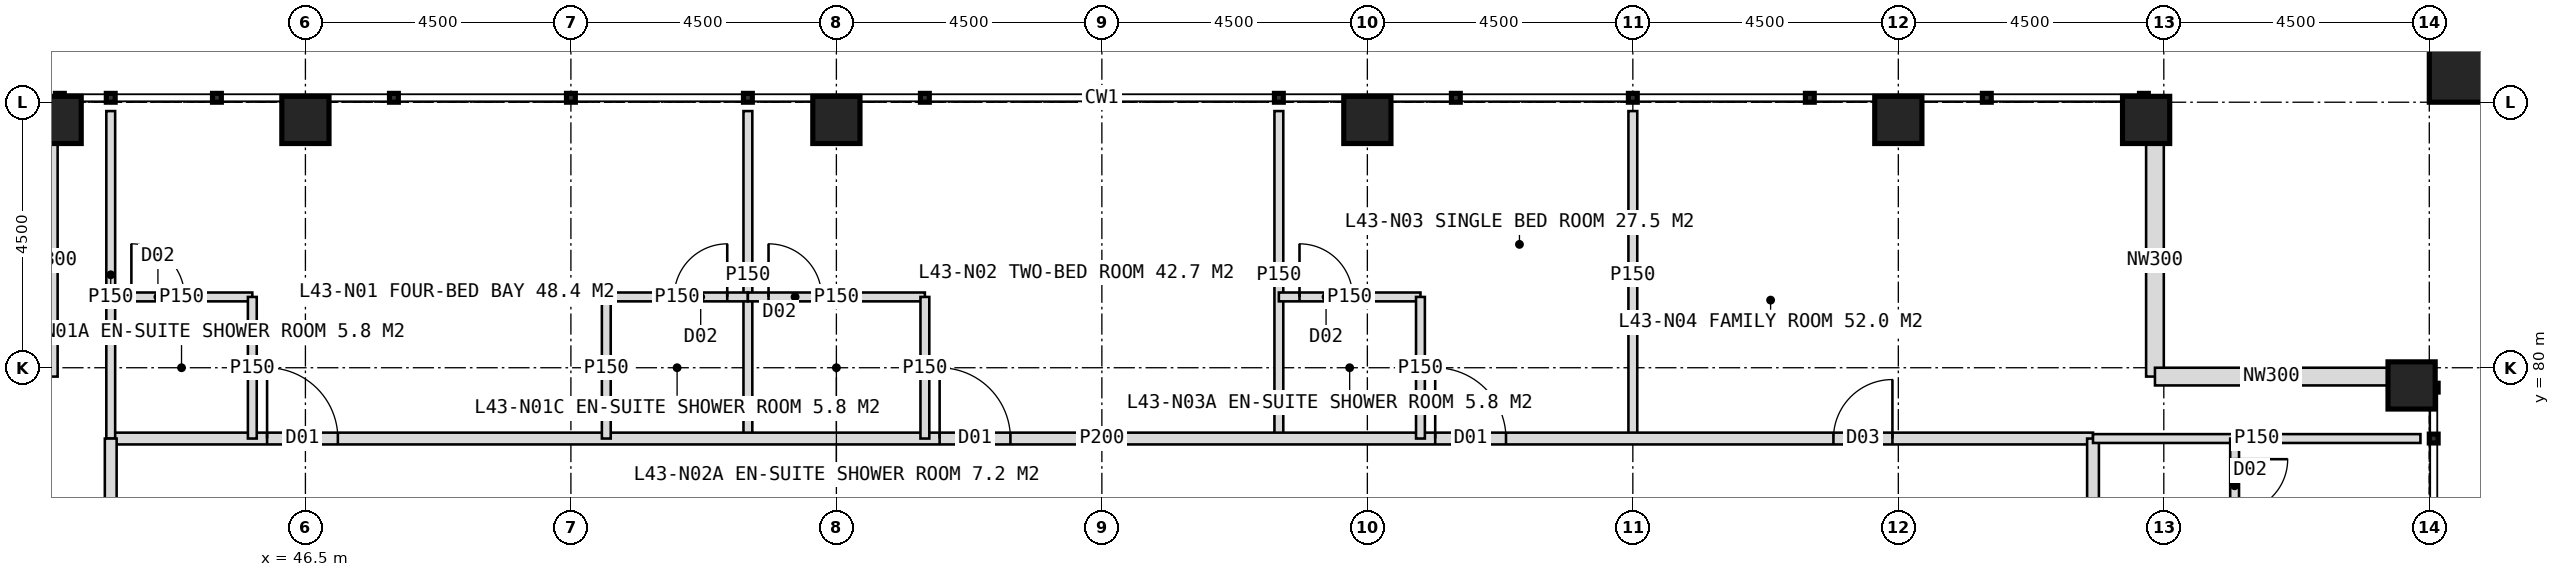
"""IFC4 building model, lengths in metres.
Left out: names, types, materials, properties, quantities, classifications, styles, units other than length and angle.
Written with IfcOpenShell. Run it as: python <this file> out.ifc"""

import sys

from ifc_helpers import new_model, si_unit, direction, frame, frame_2d, origin, origin_2d, place, context, subcontext, project, spatial, rectangle, hollow_rectangle, extrude, element, fill, save


model = new_model("IFC4")
c1 = context("Model", 3, precision=1e-05, world=origin(), true_north=direction((0.0, 1.0)))
c2 = subcontext(c1, "Body", "Model", "MODEL_VIEW")
j1 = project(units=[si_unit("LENGTHUNIT", "METRE"), si_unit("PLANEANGLEUNIT", "RADIAN")], contexts=[c1])
p1 = place(None, origin())
s1 = spatial("IfcSite", under=j1, at=p1, CompositionType="ELEMENT")
p2 = place(p1, origin())
s2 = spatial("IfcBuilding", under=s1, at=p2, CompositionType="ELEMENT")
p3 = place(p2, frame((0.0, 0.0, 181.0)))
s3 = spatial("IfcBuildingStorey", under=s2, at=p3, CompositionType="ELEMENT", Elevation=181.0)
for number, where, z_axis, x_axis in (
    (1, (42.3, 84.2, 0.0), (0.0, 0.0, 1.0), (1.0, 0.0, 0.0)),
    (2, (46.5, 84.2, 0.0), (0.0, 0.0, 1.0), (1.0, 0.0, 0.0)),
    (3, (55.5, 84.2, 0.0), (0.0, 0.0, 1.0), (1.0, 0.0, 0.0)),
    (4, (64.5, 84.2, 0.0), (0.0, 0.0, 1.0), (1.0, 0.0, 0.0)),
    (5, (73.5, 84.2, 0.0), (0.0, 0.0, 1.0), (1.0, 0.0, 0.0)),
    (6, (77.7, 84.2, 0.0), (0.0, 0.0, 1.0), (1.0, 0.0, 0.0)),
    (7, (82.2, 79.7, 0.0), (0.0, 0.0, 1.0), (1.0, 0.0, 0.0)),
):
    element("IfcColumn", number, at=place(p3, frame(where, z_axis=z_axis, x_axis=x_axis)), inside=s3, PredefinedType="COLUMN", context=c2, shape_type="SweptSolid", body=[
        extrude(hollow_rectangle(XDim=0.8, YDim=0.8, WallThickness=0.08, at=origin_2d()), origin(), (0.0, 0.0, 1.0), 4.0),
    ])
p4 = place(p3, frame((83.1, 85.1, 0.0), z_axis=(0.0, 0.0, 1.0), x_axis=(1.0, 0.0, 0.0)))
e8 = element("IfcColumn", 8, at=p4, inside=s3, PredefinedType="COLUMN", context=c2, shape_type="SweptSolid", body=[
    extrude(hollow_rectangle(XDim=1.2, YDim=1.2, WallThickness=0.07, at=origin_2d()), origin(), (0.0, 0.0, 1.0), 4.0),
])
for number, where, z_axis, x_axis in (
    (9, (77.85, 83.8, 0.0), (0.0, 0.0, 1.0), (0.0, -1.0, 0.0)),
    (10, (77.85, 79.85, 0.0), (0.0, 0.0, 1.0), (1.0, 0.0, 0.0)),
    (11, (42.15, 79.85, 0.0), (0.0, 0.0, 1.0), (0.0, 1.0, 0.0)),
):
    element("IfcWall", number, at=place(p3, frame(where, z_axis=z_axis, x_axis=x_axis)), inside=s3, PredefinedType="ELEMENTEDWALL", context=c2, shape_type="SweptSolid", body=[
        extrude(rectangle(XDim=3.95, YDim=0.3, at=frame_2d((1.975, 0.0))), origin(), (0.0, 0.0, 1.0), 2.85),
    ])
for number, where, z_axis, x_axis in (
    (12, (54.0, 78.8, 0.0), (0.0, 0.0, 1.0), (0.0, 1.0, 0.0)),
    (13, (63.0, 78.8, 0.0), (0.0, 0.0, 1.0), (0.0, 1.0, 0.0)),
    (14, (69.0, 78.8, 0.0), (0.0, 0.0, 1.0), (0.0, 1.0, 0.0)),
):
    element("IfcWall", number, at=place(p3, frame(where, z_axis=z_axis, x_axis=x_axis)), inside=s3, PredefinedType="PARTITIONING", context=c2, shape_type="SweptSolid", body=[
        extrude(rectangle(XDim=5.55, YDim=0.15, at=frame_2d((2.775, 0.0))), origin(), (0.0, 0.0, 1.0), 3.75),
    ])
p5 = place(p3, frame((43.2, 78.8, 0.0), z_axis=(0.0, 0.0, 1.0), x_axis=(1.0, 0.0, 0.0)))
e15 = element("IfcWall", 15, at=p5, inside=s3, PredefinedType="PARTITIONING", context=c2, shape_type="SweptSolid", body=[
    extrude(rectangle(XDim=33.6, YDim=0.2, at=frame_2d((16.8, 0.0))), origin(), (0.0, 0.0, 1.0), 3.75),
])
p6 = place(p5, frame((2.65, 0.0, 0.0)))
e16 = element("IfcOpeningElement", 16, at=p6, cuts=e15, PredefinedType="OPENING", context=c2, shape_type="SweptSolid", body=[
    extrude(rectangle(XDim=1.2, YDim=2.2, at=frame_2d((0.6, 1.1))), frame((0.0, 0.11, 0.0), z_axis=(0.0, -1.0, 0.0), x_axis=(1.0, 0.0, 0.0)), (0.0, 0.0, 1.0), 0.22),
])
p7 = place(p5, frame((14.05, 0.0, 0.0)))
e17 = element("IfcOpeningElement", 17, at=p7, cuts=e15, PredefinedType="OPENING", context=c2, shape_type="SweptSolid", body=[
    extrude(rectangle(XDim=1.2, YDim=2.2, at=frame_2d((0.6, 1.1))), frame((0.0, 0.11, 0.0), z_axis=(0.0, -1.0, 0.0), x_axis=(1.0, 0.0, 0.0)), (0.0, 0.0, 1.0), 0.22),
])
p8 = place(p5, frame((22.45, 0.0, 0.0)))
e18 = element("IfcOpeningElement", 18, at=p8, cuts=e15, PredefinedType="OPENING", context=c2, shape_type="SweptSolid", body=[
    extrude(rectangle(XDim=1.2, YDim=2.2, at=frame_2d((0.6, 1.1))), frame((0.0, 0.11, 0.0), z_axis=(0.0, -1.0, 0.0), x_axis=(1.0, 0.0, 0.0)), (0.0, 0.0, 1.0), 0.22),
])
p9 = place(p5, frame((29.2, 0.0, 0.0)))
e19 = element("IfcOpeningElement", 19, at=p9, cuts=e15, PredefinedType="OPENING", context=c2, shape_type="SweptSolid", body=[
    extrude(rectangle(XDim=1.0, YDim=2.1, at=frame_2d((0.5, 1.05))), frame((0.0, 0.11, 0.0), z_axis=(0.0, -1.0, 0.0), x_axis=(1.0, 0.0, 0.0)), (0.0, 0.0, 1.0), 0.22),
])
p10 = place(p3, frame((43.2, 78.8, 0.0), z_axis=(0.0, 0.0, 1.0), x_axis=(0.0, 1.0, 0.0)))
e20 = element("IfcWall", 20, at=p10, inside=s3, PredefinedType="PARTITIONING", context=c2, shape_type="SweptSolid", body=[
    extrude(rectangle(XDim=5.55, YDim=0.15, at=frame_2d((2.775, 0.0))), origin(), (0.0, 0.0, 1.0), 3.75),
])
p11 = place(p3, frame((43.2, 81.2, 0.0), z_axis=(0.0, 0.0, 1.0), x_axis=(1.0, 0.0, 0.0)))
e21 = element("IfcWall", 21, at=p11, inside=s3, PredefinedType="PARTITIONING", context=c2, shape_type="SweptSolid", body=[
    extrude(rectangle(XDim=2.4, YDim=0.15, at=frame_2d((1.2, 0.0))), origin(), (0.0, 0.0, 1.0), 3.75),
])
p12 = place(p11, frame((0.35, 0.0, 0.0)))
e22 = element("IfcOpeningElement", 22, at=p12, cuts=e21, PredefinedType="OPENING", context=c2, shape_type="SweptSolid", body=[
    extrude(rectangle(XDim=0.9, YDim=2.1, at=frame_2d((0.45, 1.05))), frame((0.0, 0.085, 0.0), z_axis=(0.0, -1.0, 0.0), x_axis=(1.0, 0.0, 0.0)), (0.0, 0.0, 1.0), 0.17),
])
p13 = place(p3, frame((45.6, 78.8, 0.0), z_axis=(0.0, 0.0, 1.0), x_axis=(0.0, 1.0, 0.0)))
e23 = element("IfcWall", 23, at=p13, inside=s3, PredefinedType="PARTITIONING", context=c2, shape_type="SweptSolid", body=[
    extrude(rectangle(XDim=2.4, YDim=0.15, at=frame_2d((1.2, 0.0))), origin(), (0.0, 0.0, 1.0), 3.75),
])
p14 = place(p3, frame((51.6, 81.2, 0.0), z_axis=(0.0, 0.0, 1.0), x_axis=(1.0, 0.0, 0.0)))
e24 = element("IfcWall", 24, at=p14, inside=s3, PredefinedType="PARTITIONING", context=c2, shape_type="SweptSolid", body=[
    extrude(rectangle(XDim=2.4, YDim=0.15, at=frame_2d((1.2, 0.0))), origin(), (0.0, 0.0, 1.0), 3.75),
])
p15 = place(p14, frame((1.15, 0.0, 0.0)))
e25 = element("IfcOpeningElement", 25, at=p15, cuts=e24, PredefinedType="OPENING", context=c2, shape_type="SweptSolid", body=[
    extrude(rectangle(XDim=0.9, YDim=2.1, at=frame_2d((0.45, 1.05))), frame((0.0, 0.085, 0.0), z_axis=(0.0, -1.0, 0.0), x_axis=(1.0, 0.0, 0.0)), (0.0, 0.0, 1.0), 0.17),
])
p16 = place(p3, frame((51.6, 78.8, 0.0), z_axis=(0.0, 0.0, 1.0), x_axis=(0.0, 1.0, 0.0)))
e26 = element("IfcWall", 26, at=p16, inside=s3, PredefinedType="PARTITIONING", context=c2, shape_type="SweptSolid", body=[
    extrude(rectangle(XDim=2.4, YDim=0.15, at=frame_2d((1.2, 0.0))), origin(), (0.0, 0.0, 1.0), 3.75),
])
p17 = place(p3, frame((54.0, 81.2, 0.0), z_axis=(0.0, 0.0, 1.0), x_axis=(1.0, 0.0, 0.0)))
e27 = element("IfcWall", 27, at=p17, inside=s3, PredefinedType="PARTITIONING", context=c2, shape_type="SweptSolid", body=[
    extrude(rectangle(XDim=3.0, YDim=0.15, at=frame_2d((1.5, 0.0))), origin(), (0.0, 0.0, 1.0), 3.75),
])
p18 = place(p17, frame((0.35, 0.0, 0.0)))
e28 = element("IfcOpeningElement", 28, at=p18, cuts=e27, PredefinedType="OPENING", context=c2, shape_type="SweptSolid", body=[
    extrude(rectangle(XDim=0.9, YDim=2.1, at=frame_2d((0.45, 1.05))), frame((0.0, 0.085, 0.0), z_axis=(0.0, -1.0, 0.0), x_axis=(1.0, 0.0, 0.0)), (0.0, 0.0, 1.0), 0.17),
])
p19 = place(p3, frame((57.0, 78.8, 0.0), z_axis=(0.0, 0.0, 1.0), x_axis=(0.0, 1.0, 0.0)))
e29 = element("IfcWall", 29, at=p19, inside=s3, PredefinedType="PARTITIONING", context=c2, shape_type="SweptSolid", body=[
    extrude(rectangle(XDim=2.4, YDim=0.15, at=frame_2d((1.2, 0.0))), origin(), (0.0, 0.0, 1.0), 3.75),
])
p20 = place(p3, frame((63.0, 81.2, 0.0), z_axis=(0.0, 0.0, 1.0), x_axis=(1.0, 0.0, 0.0)))
e30 = element("IfcWall", 30, at=p20, inside=s3, PredefinedType="PARTITIONING", context=c2, shape_type="SweptSolid", body=[
    extrude(rectangle(XDim=2.4, YDim=0.15, at=frame_2d((1.2, 0.0))), origin(), (0.0, 0.0, 1.0), 3.75),
])
p21 = place(p20, frame((0.35, 0.0, 0.0)))
e31 = element("IfcOpeningElement", 31, at=p21, cuts=e30, PredefinedType="OPENING", context=c2, shape_type="SweptSolid", body=[
    extrude(rectangle(XDim=0.9, YDim=2.1, at=frame_2d((0.45, 1.05))), frame((0.0, 0.085, 0.0), z_axis=(0.0, -1.0, 0.0), x_axis=(1.0, 0.0, 0.0)), (0.0, 0.0, 1.0), 0.17),
])
p22 = place(p3, frame((65.4, 78.8, 0.0), z_axis=(0.0, 0.0, 1.0), x_axis=(0.0, 1.0, 0.0)))
e32 = element("IfcWall", 32, at=p22, inside=s3, PredefinedType="PARTITIONING", context=c2, shape_type="SweptSolid", body=[
    extrude(rectangle(XDim=2.4, YDim=0.15, at=frame_2d((1.2, 0.0))), origin(), (0.0, 0.0, 1.0), 3.75),
])
p23 = place(p3, frame((43.2, 45.2, 0.0), z_axis=(0.0, 0.0, 1.0), x_axis=(0.0, 1.0, 0.0)))
e33 = element("IfcWall", 33, at=p23, inside=s3, PredefinedType="PARTITIONING", context=c2, shape_type="SweptSolid", body=[
    extrude(rectangle(XDim=33.6, YDim=0.2, at=frame_2d((16.8, 0.0))), origin(), (0.0, 0.0, 1.0), 3.75),
])
p24 = place(p23, frame((2.65, 0.0, 0.0)))
e34 = element("IfcOpeningElement", 34, at=p24, cuts=e33, PredefinedType="OPENING", context=c2, shape_type="SweptSolid", body=[
    extrude(rectangle(XDim=1.2, YDim=2.2, at=frame_2d((0.6, 1.1))), frame((0.0, 0.11, 0.0), z_axis=(0.0, -1.0, 0.0), x_axis=(1.0, 0.0, 0.0)), (0.0, 0.0, 1.0), 0.22),
])
p25 = place(p23, frame((13.45, 0.0, 0.0)))
e35 = element("IfcOpeningElement", 35, at=p25, cuts=e33, PredefinedType="OPENING", context=c2, shape_type="SweptSolid", body=[
    extrude(rectangle(XDim=1.2, YDim=2.2, at=frame_2d((0.6, 1.1))), frame((0.0, 0.11, 0.0), z_axis=(0.0, -1.0, 0.0), x_axis=(1.0, 0.0, 0.0)), (0.0, 0.0, 1.0), 0.22),
])
p26 = place(p23, frame((20.05, 0.0, 0.0)))
e36 = element("IfcOpeningElement", 36, at=p26, cuts=e33, PredefinedType="OPENING", context=c2, shape_type="SweptSolid", body=[
    extrude(rectangle(XDim=1.2, YDim=2.2, at=frame_2d((0.6, 1.1))), frame((0.0, 0.11, 0.0), z_axis=(0.0, -1.0, 0.0), x_axis=(1.0, 0.0, 0.0)), (0.0, 0.0, 1.0), 0.22),
])
p27 = place(p23, frame((29.05, 0.0, 0.0)))
e37 = element("IfcOpeningElement", 37, at=p27, cuts=e33, PredefinedType="OPENING", context=c2, shape_type="SweptSolid", body=[
    extrude(rectangle(XDim=1.2, YDim=2.2, at=frame_2d((0.6, 1.1))), frame((0.0, 0.11, 0.0), z_axis=(0.0, -1.0, 0.0), x_axis=(1.0, 0.0, 0.0)), (0.0, 0.0, 1.0), 0.22),
])
p28 = place(p3, frame((76.8, 78.8, 0.0), z_axis=(0.0, 0.0, 1.0), x_axis=(0.0, -1.0, 0.0)))
e38 = element("IfcWall", 38, at=p28, inside=s3, PredefinedType="PARTITIONING", context=c2, shape_type="SweptSolid", body=[
    extrude(rectangle(XDim=33.6, YDim=0.2, at=frame_2d((16.8, 0.0))), origin(), (0.0, 0.0, 1.0), 3.75),
])
p29 = place(p28, frame((2.65, 0.0, 0.0)))
e39 = element("IfcOpeningElement", 39, at=p29, cuts=e38, PredefinedType="OPENING", context=c2, shape_type="SweptSolid", body=[
    extrude(rectangle(XDim=1.2, YDim=2.2, at=frame_2d((0.6, 1.1))), frame((0.0, 0.11, 0.0), z_axis=(0.0, -1.0, 0.0), x_axis=(1.0, 0.0, 0.0)), (0.0, 0.0, 1.0), 0.22),
])
p30 = place(p28, frame((7.45, 0.0, 0.0)))
e40 = element("IfcOpeningElement", 40, at=p30, cuts=e38, PredefinedType="OPENING", context=c2, shape_type="SweptSolid", body=[
    extrude(rectangle(XDim=1.2, YDim=2.2, at=frame_2d((0.6, 1.1))), frame((0.0, 0.11, 0.0), z_axis=(0.0, -1.0, 0.0), x_axis=(1.0, 0.0, 0.0)), (0.0, 0.0, 1.0), 0.22),
])
p31 = place(p28, frame((13.45, 0.0, 0.0)))
e41 = element("IfcOpeningElement", 41, at=p31, cuts=e38, PredefinedType="OPENING", context=c2, shape_type="SweptSolid", body=[
    extrude(rectangle(XDim=1.2, YDim=2.2, at=frame_2d((0.6, 1.1))), frame((0.0, 0.11, 0.0), z_axis=(0.0, -1.0, 0.0), x_axis=(1.0, 0.0, 0.0)), (0.0, 0.0, 1.0), 0.22),
])
p32 = place(p28, frame((19.45, 0.0, 0.0)))
e42 = element("IfcOpeningElement", 42, at=p32, cuts=e38, PredefinedType="OPENING", context=c2, shape_type="SweptSolid", body=[
    extrude(rectangle(XDim=1.2, YDim=2.2, at=frame_2d((0.6, 1.1))), frame((0.0, 0.11, 0.0), z_axis=(0.0, -1.0, 0.0), x_axis=(1.0, 0.0, 0.0)), (0.0, 0.0, 1.0), 0.22),
])
p33 = place(p28, frame((25.45, 0.0, 0.0)))
e43 = element("IfcOpeningElement", 43, at=p33, cuts=e38, PredefinedType="OPENING", context=c2, shape_type="SweptSolid", body=[
    extrude(rectangle(XDim=1.2, YDim=2.2, at=frame_2d((0.6, 1.1))), frame((0.0, 0.11, 0.0), z_axis=(0.0, -1.0, 0.0), x_axis=(1.0, 0.0, 0.0)), (0.0, 0.0, 1.0), 0.22),
])
p34 = place(p3, frame((76.8, 78.8, 0.0), z_axis=(0.0, 0.0, 1.0), x_axis=(1.0, 0.0, 0.0)))
e44 = element("IfcWall", 44, at=p34, inside=s3, PredefinedType="PARTITIONING", context=c2, shape_type="SweptSolid", body=[
    extrude(rectangle(XDim=5.55, YDim=0.15, at=frame_2d((2.775, 0.0))), origin(), (0.0, 0.0, 1.0), 3.75),
])
p35 = place(p3, frame((79.2, 78.8, 0.0), z_axis=(0.0, 0.0, 1.0), x_axis=(0.0, -1.0, 0.0)))
e45 = element("IfcWall", 45, at=p35, inside=s3, PredefinedType="PARTITIONING", context=c2, shape_type="SweptSolid", body=[
    extrude(rectangle(XDim=2.4, YDim=0.15, at=frame_2d((1.2, 0.0))), origin(), (0.0, 0.0, 1.0), 3.75),
])
p36 = place(p35, frame((0.35, 0.0, 0.0)))
e46 = element("IfcOpeningElement", 46, at=p36, cuts=e45, PredefinedType="OPENING", context=c2, shape_type="SweptSolid", body=[
    extrude(rectangle(XDim=0.9, YDim=2.1, at=frame_2d((0.45, 1.05))), frame((0.0, 0.085, 0.0), z_axis=(0.0, -1.0, 0.0), x_axis=(1.0, 0.0, 0.0)), (0.0, 0.0, 1.0), 0.17),
])
p37 = place(p6, origin())
e47 = element("IfcDoor", 47, at=p37, inside=s3, OperationType="SINGLE_SWING_LEFT", PredefinedType="DOOR", context=c2, shape_type="SweptSolid", body=[
    extrude(rectangle(XDim=1.2, YDim=2.2, at=frame_2d((0.6, 1.1))), frame((0.0, 0.025, 0.0), z_axis=(0.0, -1.0, 0.0), x_axis=(1.0, 0.0, 0.0)), (0.0, 0.0, 1.0), 0.05),
])
fill(e16, e47)
p38 = place(p12, origin())
e48 = element("IfcDoor", 48, at=p38, inside=s3, OperationType="SINGLE_SWING_LEFT", PredefinedType="DOOR", context=c2, shape_type="SweptSolid", body=[
    extrude(rectangle(XDim=0.9, YDim=2.1, at=frame_2d((0.45, 1.05))), frame((0.0, 0.025, 0.0), z_axis=(0.0, -1.0, 0.0), x_axis=(1.0, 0.0, 0.0)), (0.0, 0.0, 1.0), 0.05),
])
fill(e22, e48)
p39 = place(p15, origin())
e49 = element("IfcDoor", 49, at=p39, inside=s3, OperationType="SINGLE_SWING_RIGHT", PredefinedType="DOOR", context=c2, shape_type="SweptSolid", body=[
    extrude(rectangle(XDim=0.9, YDim=2.1, at=frame_2d((0.45, 1.05))), frame((0.0, 0.025, 0.0), z_axis=(0.0, -1.0, 0.0), x_axis=(1.0, 0.0, 0.0)), (0.0, 0.0, 1.0), 0.05),
])
fill(e25, e49)
p40 = place(p7, origin())
e50 = element("IfcDoor", 50, at=p40, inside=s3, OperationType="SINGLE_SWING_LEFT", PredefinedType="DOOR", context=c2, shape_type="SweptSolid", body=[
    extrude(rectangle(XDim=1.2, YDim=2.2, at=frame_2d((0.6, 1.1))), frame((0.0, 0.025, 0.0), z_axis=(0.0, -1.0, 0.0), x_axis=(1.0, 0.0, 0.0)), (0.0, 0.0, 1.0), 0.05),
])
fill(e17, e50)
p41 = place(p18, origin())
e51 = element("IfcDoor", 51, at=p41, inside=s3, OperationType="SINGLE_SWING_LEFT", PredefinedType="DOOR", context=c2, shape_type="SweptSolid", body=[
    extrude(rectangle(XDim=0.9, YDim=2.1, at=frame_2d((0.45, 1.05))), frame((0.0, 0.025, 0.0), z_axis=(0.0, -1.0, 0.0), x_axis=(1.0, 0.0, 0.0)), (0.0, 0.0, 1.0), 0.05),
])
fill(e28, e51)
p42 = place(p8, origin())
e52 = element("IfcDoor", 52, at=p42, inside=s3, OperationType="SINGLE_SWING_LEFT", PredefinedType="DOOR", context=c2, shape_type="SweptSolid", body=[
    extrude(rectangle(XDim=1.2, YDim=2.2, at=frame_2d((0.6, 1.1))), frame((0.0, 0.025, 0.0), z_axis=(0.0, -1.0, 0.0), x_axis=(1.0, 0.0, 0.0)), (0.0, 0.0, 1.0), 0.05),
])
fill(e18, e52)
p43 = place(p21, origin())
e53 = element("IfcDoor", 53, at=p43, inside=s3, OperationType="SINGLE_SWING_LEFT", PredefinedType="DOOR", context=c2, shape_type="SweptSolid", body=[
    extrude(rectangle(XDim=0.9, YDim=2.1, at=frame_2d((0.45, 1.05))), frame((0.0, 0.025, 0.0), z_axis=(0.0, -1.0, 0.0), x_axis=(1.0, 0.0, 0.0)), (0.0, 0.0, 1.0), 0.05),
])
fill(e31, e53)
p44 = place(p9, origin())
e54 = element("IfcDoor", 54, at=p44, inside=s3, OperationType="SINGLE_SWING_RIGHT", PredefinedType="DOOR", context=c2, shape_type="SweptSolid", body=[
    extrude(rectangle(XDim=1.0, YDim=2.1, at=frame_2d((0.5, 1.05))), frame((0.0, 0.025, 0.0), z_axis=(0.0, -1.0, 0.0), x_axis=(1.0, 0.0, 0.0)), (0.0, 0.0, 1.0), 0.05),
])
fill(e19, e54)
p45 = place(p36, origin())
e55 = element("IfcDoor", 55, at=p45, inside=s3, OperationType="SINGLE_SWING_LEFT", PredefinedType="DOOR", context=c2, shape_type="SweptSolid", body=[
    extrude(rectangle(XDim=0.9, YDim=2.1, at=frame_2d((0.45, 1.05))), frame((0.0, 0.025, 0.0), z_axis=(0.0, -1.0, 0.0), x_axis=(1.0, 0.0, 0.0)), (0.0, 0.0, 1.0), 0.05),
])
fill(e46, e55)
save(model, sys.argv[1])
